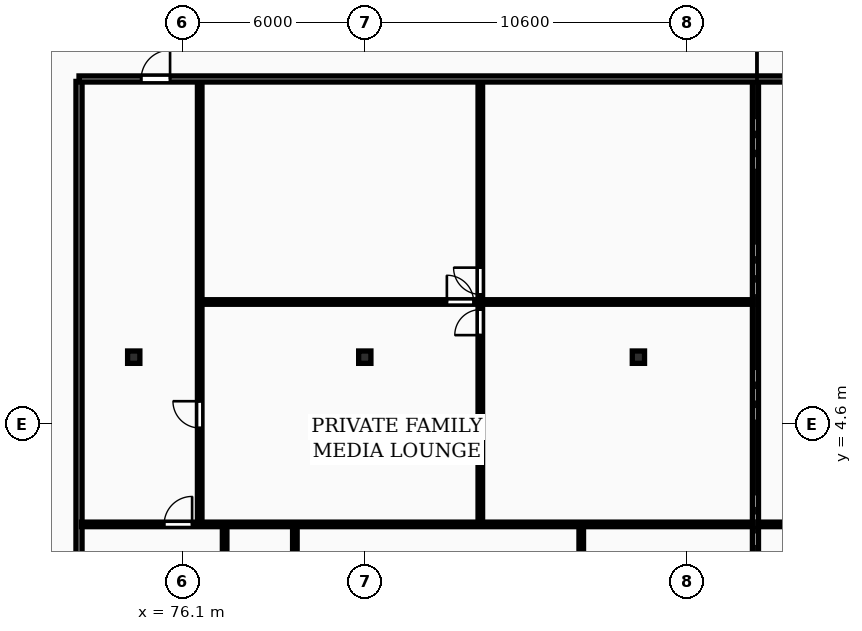
"""IFC4 building model, lengths in metres.
Left out: names, types, materials, properties, quantities, classifications, styles, units other than length and angle.
Written with IfcOpenShell. Run it as: python <this file> out.ifc"""

import sys

from ifc_helpers import new_model, si_unit, direction, frame, frame_2d, origin, origin_2d, place, context, subcontext, project, spatial, rectangle, i_section, extrude, element, fill, save


model = new_model("IFC4")
c1 = context("Model", 3, precision=1e-05, world=origin(), true_north=direction((0.0, 1.0)))
c2 = subcontext(c1, "Body", "Model", "MODEL_VIEW")
j1 = project(units=[si_unit("LENGTHUNIT", "METRE"), si_unit("PLANEANGLEUNIT", "RADIAN")], contexts=[c1])
p1 = place(None, origin())
s1 = spatial("IfcSite", under=j1, at=p1, CompositionType="ELEMENT")
p2 = place(p1, origin())
s2 = spatial("IfcBuilding", under=s1, at=p2, CompositionType="ELEMENT")
p3 = place(p2, frame((0.0, 0.0, 146.5)))
s3 = spatial("IfcBuildingStorey", under=s2, at=p3, CompositionType="ELEMENT", Elevation=146.5)
for number, where, z_axis, x_axis in (
    (1, (74.5, 6.8, 0.0), (0.0, 0.0, 1.0), (1.0, 0.0, 0.0)),
    (2, (82.1, 6.8, 0.0), (0.0, 0.0, 1.0), (1.0, 0.0, 0.0)),
    (3, (91.1, 6.8, 0.0), (0.0, 0.0, 1.0), (1.0, 0.0, 0.0)),
):
    element("IfcColumn", number, at=place(p3, frame(where, z_axis=z_axis, x_axis=x_axis)), inside=s3, PredefinedType="COLUMN", context=c2, shape_type="SweptSolid", body=[
        extrude(i_section(OverallWidth=0.403, OverallDepth=0.406, WebThickness=0.027, FlangeThickness=0.043, FilletRadius=0.015, at=origin_2d()), origin(), (0.0, 0.0, 1.0), 3.6),
    ])
for number, where, z_axis, x_axis in (
    (4, (72.7, -8.7, 0.0), (0.0, 0.0, 1.0), (0.0, 1.0, 0.0)),
    (5, (94.95, -8.7, 0.0), (0.0, 0.0, 1.0), (0.0, 1.0, 0.0)),
):
    element("IfcWall", number, at=place(p3, frame(where, z_axis=z_axis, x_axis=x_axis)), inside=s3, PredefinedType="PARTITIONING", context=c2, shape_type="SweptSolid", body=[
        extrude(rectangle(XDim=24.57, YDim=0.2, at=frame_2d((12.285, 0.0))), origin(), (0.0, 0.0, 1.0), 3.31),
    ])
p4 = place(p3, frame((85.9, 1.34, 0.0), z_axis=(0.0, 0.0, 1.0), x_axis=(0.0, 1.0, 0.0)))
e6 = element("IfcWall", 6, at=p4, inside=s3, PredefinedType="PARTITIONING", context=c2, shape_type="SweptSolid", body=[
    extrude(rectangle(XDim=14.55, YDim=0.15, at=frame_2d((7.275, 0.0))), origin(), (0.0, 0.0, 1.0), 3.31),
])
p5 = place(p4, frame((6.185, 0.0, 0.0)))
e7 = element("IfcOpeningElement", 7, at=p5, cuts=e6, PredefinedType="OPENING", context=c2, shape_type="SweptSolid", body=[
    extrude(rectangle(XDim=0.84, YDim=2.04, at=frame_2d((0.42, 1.02))), frame((0.0, 0.085, 0.0), z_axis=(0.0, -1.0, 0.0), x_axis=(1.0, 0.0, 0.0)), (0.0, 0.0, 1.0), 0.17),
])
p6 = place(p4, frame((7.525, 0.0, 0.0)))
e8 = element("IfcOpeningElement", 8, at=p6, cuts=e6, PredefinedType="OPENING", context=c2, shape_type="SweptSolid", body=[
    extrude(rectangle(XDim=0.88, YDim=2.06, at=frame_2d((0.44, 1.03))), frame((0.0, 0.085, 0.0), z_axis=(0.0, -1.0, 0.0), x_axis=(1.0, 0.0, 0.0)), (0.0, 0.0, 1.0), 0.17),
])
p7 = place(p3, frame((76.73, 8.615, 0.0), z_axis=(0.0, 0.0, 1.0), x_axis=(1.0, 0.0, 0.0)))
e9 = element("IfcWall", 9, at=p7, inside=s3, PredefinedType="PARTITIONING", context=c2, shape_type="SweptSolid", body=[
    extrude(rectangle(XDim=18.14, YDim=0.15, at=frame_2d((9.07, 0.0))), origin(), (0.0, 0.0, 1.0), 3.31),
])
p8 = place(p7, frame((8.07, 0.0, 0.0)))
e10 = element("IfcOpeningElement", 10, at=p8, cuts=e9, PredefinedType="OPENING", context=c2, shape_type="SweptSolid", body=[
    extrude(rectangle(XDim=0.88, YDim=2.06, at=frame_2d((0.44, 1.03))), frame((0.0, 0.085, 0.0), z_axis=(0.0, -1.0, 0.0), x_axis=(1.0, 0.0, 0.0)), (0.0, 0.0, 1.0), 0.17),
])
p9 = place(p3, frame((76.67, 1.34, 0.0), z_axis=(0.0, 0.0, 1.0), x_axis=(0.0, 1.0, 0.0)))
e11 = element("IfcWall", 11, at=p9, inside=s3, PredefinedType="PARTITIONING", context=c2, shape_type="SweptSolid", body=[
    extrude(rectangle(XDim=14.55, YDim=0.15, at=frame_2d((7.275, 0.0))), origin(), (0.0, 0.0, 1.0), 3.31),
])
p10 = place(p9, frame((3.132, 0.0, 0.0)))
e12 = element("IfcOpeningElement", 12, at=p10, cuts=e11, PredefinedType="OPENING", context=c2, shape_type="SweptSolid", body=[
    extrude(rectangle(XDim=0.88, YDim=2.06, at=frame_2d((0.44, 1.03))), frame((0.0, 0.085, 0.0), z_axis=(0.0, -1.0, 0.0), x_axis=(1.0, 0.0, 0.0)), (0.0, 0.0, 1.0), 0.17),
])
p11 = place(p3, frame((79.8, -1.32, 0.0), z_axis=(0.0, 0.0, 1.0), x_axis=(0.0, 1.0, 0.0)))
e13 = element("IfcWall", 13, at=p11, inside=s3, PredefinedType="PARTITIONING", context=c2, shape_type="SweptSolid", body=[
    extrude(rectangle(XDim=2.58, YDim=0.15, at=frame_2d((1.29, 0.0))), origin(), (0.0, 0.0, 1.0), 3.31),
])
p12 = place(p3, frame((77.49, -8.7, 0.0), z_axis=(0.0, 0.0, 1.0), x_axis=(0.0, 1.0, 0.0)))
e14 = element("IfcWall", 14, at=p12, inside=s3, PredefinedType="PARTITIONING", context=c2, shape_type="SweptSolid", body=[
    extrude(rectangle(XDim=9.96, YDim=0.15, at=frame_2d((4.98, 0.0))), origin(), (0.0, 0.0, 1.0), 3.31),
])
p13 = place(p12, frame((5.22, 0.0, 0.0)))
e15 = element("IfcOpeningElement", 15, at=p13, cuts=e14, PredefinedType="OPENING", context=c2, shape_type="SweptSolid", body=[
    extrude(rectangle(XDim=0.92, YDim=2.08, at=frame_2d((0.46, 1.04))), frame((0.0, 0.085, 0.0), z_axis=(0.0, -1.0, 0.0), x_axis=(1.0, 0.0, 0.0)), (0.0, 0.0, 1.0), 0.17),
])
p14 = place(p3, frame((89.22, -1.32, 0.0), z_axis=(0.0, 0.0, 1.0), x_axis=(0.0, 1.0, 0.0)))
e16 = element("IfcWall", 16, at=p14, inside=s3, PredefinedType="PARTITIONING", context=c2, shape_type="SweptSolid", body=[
    extrude(rectangle(XDim=2.58, YDim=0.15, at=frame_2d((1.29, 0.0))), origin(), (0.0, 0.0, 1.0), 3.31),
])
p15 = place(p3, frame((72.78, 1.3, 0.0), z_axis=(0.0, 0.0, 1.0), x_axis=(1.0, 0.0, 0.0)))
e17 = element("IfcWall", 17, at=p15, inside=s3, PredefinedType="PARTITIONING", context=c2, shape_type="SweptSolid", body=[
    extrude(rectangle(XDim=22.09, YDim=0.15, at=frame_2d((11.045, 0.0))), origin(), (0.0, 0.0, 1.0), 3.31),
])
p16 = place(p15, frame((2.72, 0.0, 0.0)))
e18 = element("IfcOpeningElement", 18, at=p16, cuts=e17, PredefinedType="OPENING", context=c2, shape_type="SweptSolid", body=[
    extrude(rectangle(XDim=0.92, YDim=2.08, at=frame_2d((0.46, 1.04))), frame((0.0, 0.085, 0.0), z_axis=(0.0, -1.0, 0.0), x_axis=(1.0, 0.0, 0.0)), (0.0, 0.0, 1.0), 0.17),
])
p17 = place(p3, frame((95.03, 1.3, 0.0), z_axis=(0.0, 0.0, 1.0), x_axis=(1.0, 0.0, 0.0)))
e19 = element("IfcWall", 19, at=p17, inside=s3, PredefinedType="PARTITIONING", context=c2, shape_type="SweptSolid", body=[
    extrude(rectangle(XDim=15.298, YDim=0.15, at=frame_2d((7.649, 0.0))), origin(), (0.0, 0.0, 1.0), 3.31),
])
p18 = place(p17, frame((2.72, 0.0, 0.0)))
e20 = element("IfcOpeningElement", 20, at=p18, cuts=e19, PredefinedType="OPENING", context=c2, shape_type="SweptSolid", body=[
    extrude(rectangle(XDim=0.92, YDim=2.08, at=frame_2d((0.46, 1.04))), frame((0.0, 0.085, 0.0), z_axis=(0.0, -1.0, 0.0), x_axis=(1.0, 0.0, 0.0)), (0.0, 0.0, 1.0), 0.17),
])
p19 = place(p3, frame((72.7, 15.95, 0.0), z_axis=(0.0, 0.0, 1.0), x_axis=(1.0, 0.0, 0.0)))
e21 = element("IfcWall", 21, at=p19, inside=s3, PredefinedType="PARTITIONING", context=c2, shape_type="SweptSolid", body=[
    extrude(rectangle(XDim=58.0, YDim=0.2, at=frame_2d((29.0, 0.0))), origin(), (0.0, 0.0, 1.0), 3.31),
])
p20 = place(p19, frame((2.045, 0.0, 0.0)))
e22 = element("IfcOpeningElement", 22, at=p20, cuts=e21, PredefinedType="OPENING", context=c2, shape_type="SweptSolid", body=[
    extrude(rectangle(XDim=0.95, YDim=2.15, at=frame_2d((0.475, 1.075))), frame((0.0, 0.11, 0.0), z_axis=(0.0, -1.0, 0.0), x_axis=(1.0, 0.0, 0.0)), (0.0, 0.0, 1.0), 0.22),
])
p21 = place(p19, frame((24.295, 0.0, 0.0)))
e23 = element("IfcOpeningElement", 23, at=p21, cuts=e21, PredefinedType="OPENING", context=c2, shape_type="SweptSolid", body=[
    extrude(rectangle(XDim=0.95, YDim=2.15, at=frame_2d((0.475, 1.075))), frame((0.0, 0.11, 0.0), z_axis=(0.0, -1.0, 0.0), x_axis=(1.0, 0.0, 0.0)), (0.0, 0.0, 1.0), 0.22),
])
p22 = place(p19, frame((39.753, 0.0, 0.0)))
e24 = element("IfcOpeningElement", 24, at=p22, cuts=e21, PredefinedType="OPENING", context=c2, shape_type="SweptSolid", body=[
    extrude(rectangle(XDim=0.95, YDim=2.15, at=frame_2d((0.475, 1.075))), frame((0.0, 0.11, 0.0), z_axis=(0.0, -1.0, 0.0), x_axis=(1.0, 0.0, 0.0)), (0.0, 0.0, 1.0), 0.22),
])
p23 = place(p5, origin())
e25 = element("IfcDoor", 25, at=p23, inside=s3, OperationType="SINGLE_SWING_LEFT", PredefinedType="DOOR", context=c2, shape_type="SweptSolid", body=[
    extrude(rectangle(XDim=0.84, YDim=2.04, at=frame_2d((0.42, 1.02))), frame((0.0, 0.025, 0.0), z_axis=(0.0, -1.0, 0.0), x_axis=(1.0, 0.0, 0.0)), (0.0, 0.0, 1.0), 0.05),
])
fill(e7, e25)
p24 = place(p6, origin())
e26 = element("IfcDoor", 26, at=p24, inside=s3, OperationType="SINGLE_SWING_RIGHT", PredefinedType="DOOR", context=c2, shape_type="SweptSolid", body=[
    extrude(rectangle(XDim=0.88, YDim=2.06, at=frame_2d((0.44, 1.03))), frame((0.0, 0.025, 0.0), z_axis=(0.0, -1.0, 0.0), x_axis=(1.0, 0.0, 0.0)), (0.0, 0.0, 1.0), 0.05),
])
fill(e8, e26)
p25 = place(p8, origin())
e27 = element("IfcDoor", 27, at=p25, inside=s3, OperationType="SINGLE_SWING_LEFT", PredefinedType="DOOR", context=c2, shape_type="SweptSolid", body=[
    extrude(rectangle(XDim=0.88, YDim=2.06, at=frame_2d((0.44, 1.03))), frame((0.0, 0.025, 0.0), z_axis=(0.0, -1.0, 0.0), x_axis=(1.0, 0.0, 0.0)), (0.0, 0.0, 1.0), 0.05),
])
fill(e10, e27)
p26 = place(p10, origin())
e28 = element("IfcDoor", 28, at=p26, inside=s3, OperationType="SINGLE_SWING_RIGHT", PredefinedType="DOOR", context=c2, shape_type="SweptSolid", body=[
    extrude(rectangle(XDim=0.88, YDim=2.06, at=frame_2d((0.44, 1.03))), frame((0.0, 0.025, 0.0), z_axis=(0.0, -1.0, 0.0), x_axis=(1.0, 0.0, 0.0)), (0.0, 0.0, 1.0), 0.05),
])
fill(e12, e28)
p27 = place(p16, origin())
e29 = element("IfcDoor", 29, at=p27, inside=s3, OperationType="SINGLE_SWING_RIGHT", PredefinedType="DOOR", context=c2, shape_type="SweptSolid", body=[
    extrude(rectangle(XDim=0.92, YDim=2.08, at=frame_2d((0.46, 1.04))), frame((0.0, 0.025, 0.0), z_axis=(0.0, -1.0, 0.0), x_axis=(1.0, 0.0, 0.0)), (0.0, 0.0, 1.0), 0.05),
])
fill(e18, e29)
p28 = place(p20, origin())
e30 = element("IfcDoor", 30, at=p28, inside=s3, OperationType="SINGLE_SWING_RIGHT", PredefinedType="DOOR", context=c2, shape_type="SweptSolid", body=[
    extrude(rectangle(XDim=0.95, YDim=2.15, at=frame_2d((0.475, 1.075))), frame((0.0, 0.025, 0.0), z_axis=(0.0, -1.0, 0.0), x_axis=(1.0, 0.0, 0.0)), (0.0, 0.0, 1.0), 0.05),
])
fill(e22, e30)
save(model, sys.argv[1])
